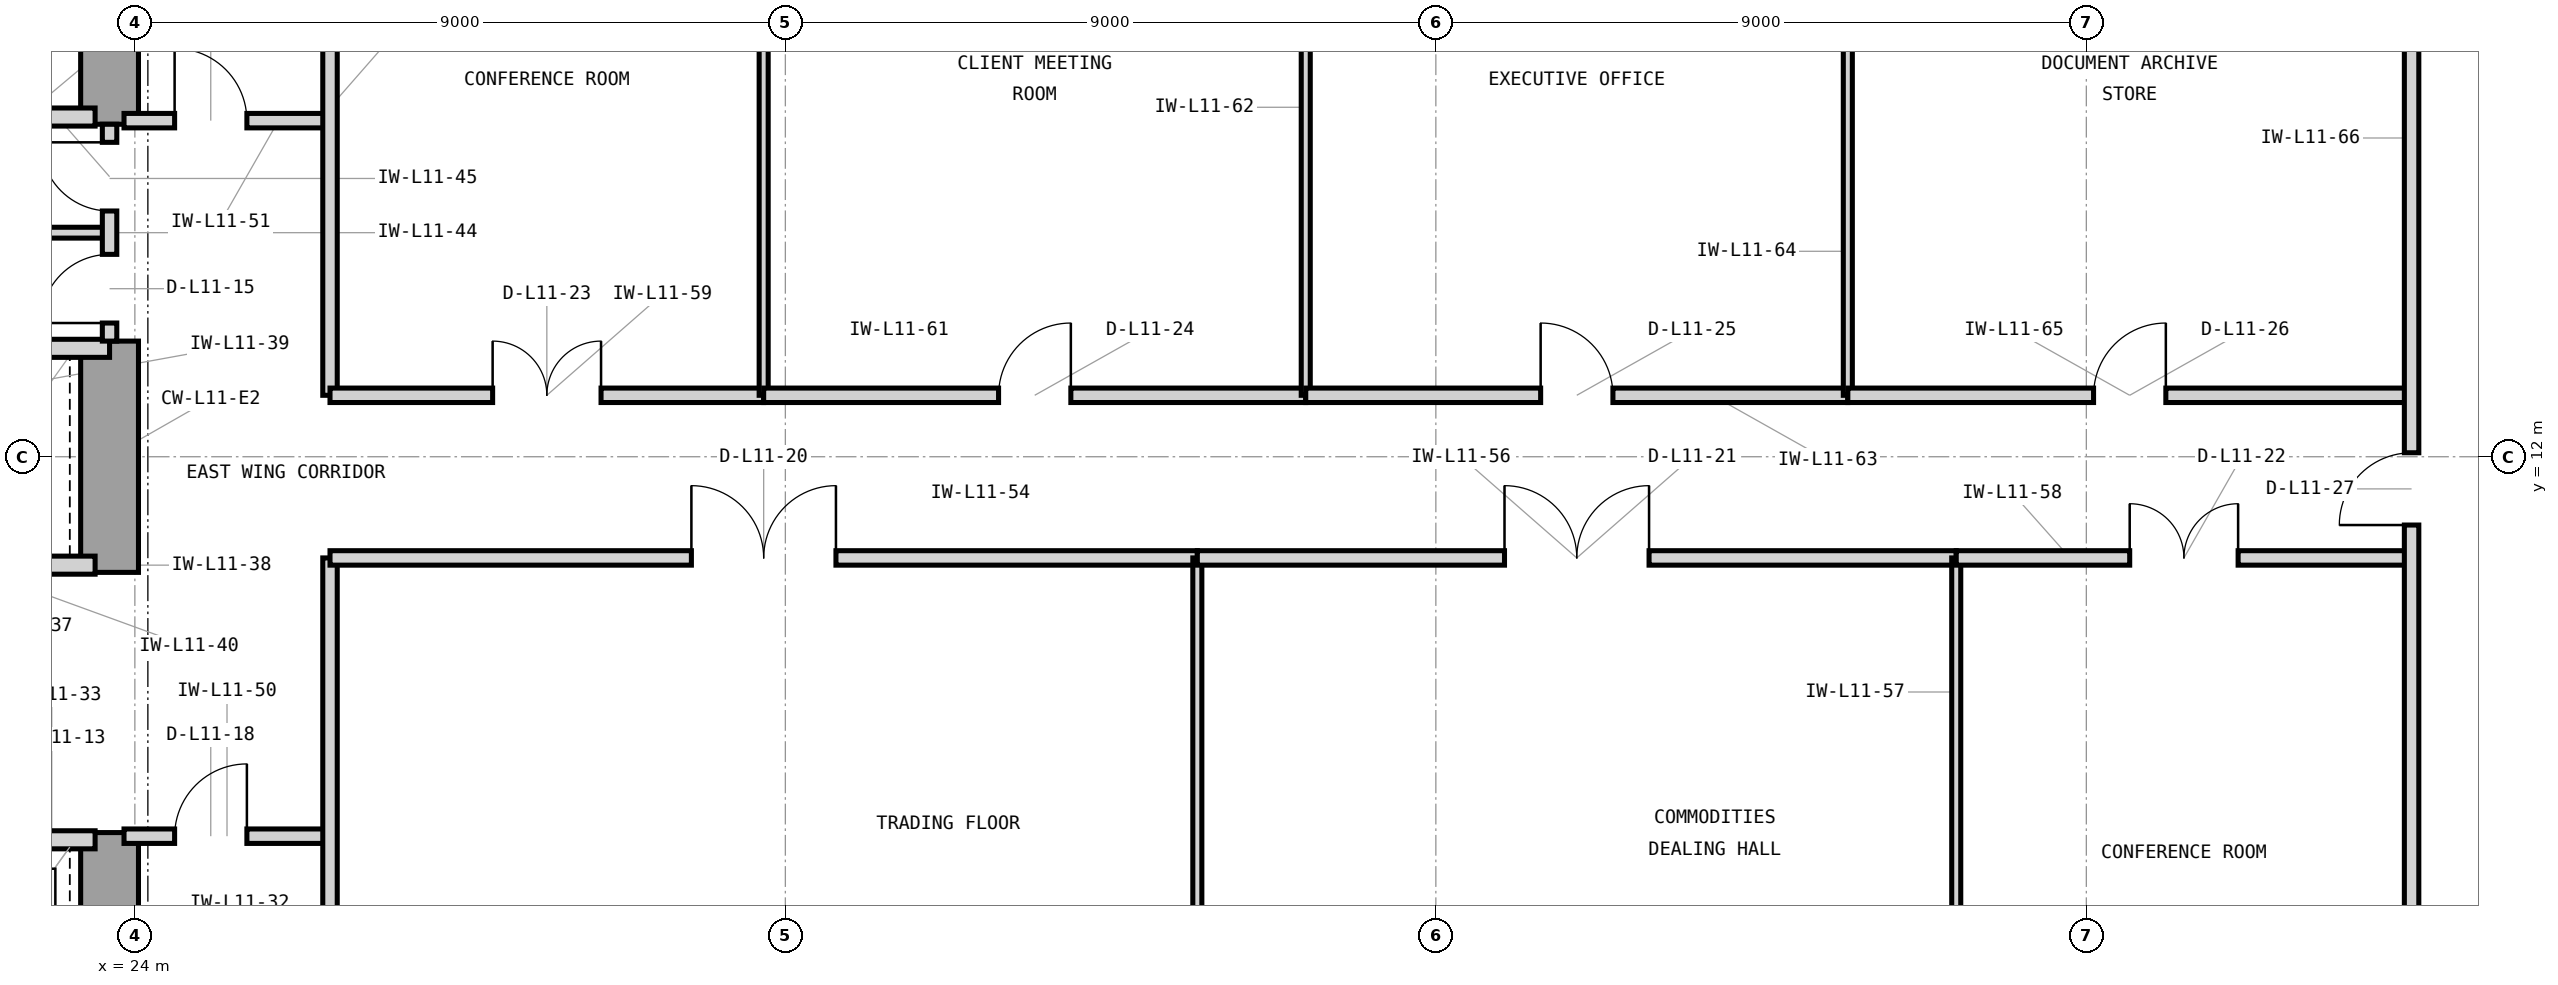
"""IFC4 building model, lengths in metres.
Left out: names, types, materials, properties, quantities, classifications, styles, units other than length and angle.
Written with IfcOpenShell. Run it as: python <this file> out.ifc"""

import sys

from ifc_helpers import new_model, si_unit, direction, frame, frame_2d, origin, place, context, subcontext, project, spatial, rectangle, extrude, element, fill, save


model = new_model("IFC4")
c1 = context("Model", 3, precision=1e-05, world=origin(), true_north=direction((0.0, 1.0)))
c2 = subcontext(c1, "Body", "Model", "MODEL_VIEW")
j1 = project(units=[si_unit("LENGTHUNIT", "METRE"), si_unit("PLANEANGLEUNIT", "RADIAN")], contexts=[c1])
p1 = place(None, origin())
s1 = spatial("IfcSite", under=j1, at=p1, CompositionType="ELEMENT")
p2 = place(p1, origin())
s2 = spatial("IfcBuilding", under=s1, at=p2, CompositionType="ELEMENT")
p3 = place(p2, frame((0.0, 0.0, 51.0)))
s3 = spatial("IfcBuildingStorey", under=s2, at=p3, CompositionType="ELEMENT", Elevation=51.0)
p4 = place(p3, frame((23.65, 3.75, 0.0), z_axis=(0.0, 0.0, 1.0), x_axis=(0.0, 1.0, 0.0)))
e1 = element("IfcWall", 1, at=p4, inside=s3, PredefinedType="SHEAR", context=c2, shape_type="SweptSolid", body=[
    extrude(rectangle(XDim=3.05, YDim=0.8, at=frame_2d((1.525, 0.0))), origin(), (0.0, 0.0, 1.0), 4.2),
])
p5 = place(p3, frame((23.65, 10.4, 0.0), z_axis=(0.0, 0.0, 1.0), x_axis=(0.0, 1.0, 0.0)))
e2 = element("IfcWall", 2, at=p5, inside=s3, PredefinedType="SHEAR", context=c2, shape_type="SweptSolid", body=[
    extrude(rectangle(XDim=3.2, YDim=0.8, at=frame_2d((1.6, 0.0))), origin(), (0.0, 0.0, 1.0), 4.2),
])
p6 = place(p3, frame((23.65, 16.6, 0.0), z_axis=(0.0, 0.0, 1.0), x_axis=(0.0, 1.0, 0.0)))
e3 = element("IfcWall", 3, at=p6, inside=s3, PredefinedType="SHEAR", context=c2, shape_type="SweptSolid", body=[
    extrude(rectangle(XDim=4.05, YDim=0.8, at=frame_2d((2.025, 0.0))), origin(), (0.0, 0.0, 1.0), 4.2),
])
p7 = place(p3, frame((21.05, 16.7, 0.0), z_axis=(0.0, 0.0, 1.0), x_axis=(1.0, 0.0, 0.0)))
e4 = element("IfcWall", 4, at=p7, inside=s3, PredefinedType="PARTITIONING", context=c2, shape_type="SweptSolid", body=[
    extrude(rectangle(XDim=2.4, YDim=0.25, at=frame_2d((1.2, 0.0))), origin(), (0.0, 0.0, 1.0), 3.426),
])
p8 = place(p3, frame((21.05, 6.7, 0.0), z_axis=(0.0, 0.0, 1.0), x_axis=(1.0, 0.0, 0.0)))
e5 = element("IfcWall", 5, at=p8, inside=s3, PredefinedType="PARTITIONING", context=c2, shape_type="SweptSolid", body=[
    extrude(rectangle(XDim=2.4, YDim=0.25, at=frame_2d((1.2, 0.0))), origin(), (0.0, 0.0, 1.0), 3.426),
])
p9 = place(p8, frame((0.48, 0.0, 0.0)))
e6 = element("IfcOpeningElement", 6, at=p9, cuts=e5, PredefinedType="OPENING", context=c2, shape_type="SweptSolid", body=[
    extrude(rectangle(XDim=1.15, YDim=2.25, at=frame_2d((0.575, 1.125))), frame((0.0, 0.135, 0.0), z_axis=(0.0, -1.0, 0.0), x_axis=(1.0, 0.0, 0.0)), (0.0, 0.0, 1.0), 0.27),
])
p10 = place(p3, frame((21.05, 10.5, 0.0), z_axis=(0.0, 0.0, 1.0), x_axis=(1.0, 0.0, 0.0)))
e7 = element("IfcWall", 7, at=p10, inside=s3, PredefinedType="PARTITIONING", context=c2, shape_type="SweptSolid", body=[
    extrude(rectangle(XDim=2.4, YDim=0.25, at=frame_2d((1.2, 0.0))), origin(), (0.0, 0.0, 1.0), 3.426),
])
p11 = place(p3, frame((14.7, 13.5, 0.0), z_axis=(0.0, 0.0, 1.0), x_axis=(1.0, 0.0, 0.0)))
e8 = element("IfcWall", 8, at=p11, inside=s3, PredefinedType="PARTITIONING", context=c2, shape_type="SweptSolid", body=[
    extrude(rectangle(XDim=8.95, YDim=0.25, at=frame_2d((4.475, 0.0))), origin(), (0.0, 0.0, 1.0), 3.426),
])
p12 = place(p3, frame((19.65, 15.1, 0.0), z_axis=(0.0, 0.0, 1.0), x_axis=(1.0, 0.0, 0.0)))
e9 = element("IfcWall", 9, at=p12, inside=s3, PredefinedType="PARTITIONING", context=c2, shape_type="SweptSolid", body=[
    extrude(rectangle(XDim=4.0, YDim=0.15, at=frame_2d((2.0, 0.0))), origin(), (0.0, 0.0, 1.0), 3.97),
])
p13 = place(p3, frame((23.65, 13.6, 0.0), z_axis=(0.0, 0.0, 1.0), x_axis=(0.0, 1.0, 0.0)))
e10 = element("IfcWall", 10, at=p13, inside=s3, PredefinedType="PARTITIONING", context=c2, shape_type="SweptSolid", body=[
    extrude(rectangle(XDim=3.0, YDim=0.2, at=frame_2d((1.5, 0.0))), origin(), (0.0, 0.0, 1.0), 3.97),
])
p14 = place(p13, frame((0.25, 0.0, 0.0)))
e11 = element("IfcOpeningElement", 11, at=p14, cuts=e10, PredefinedType="OPENING", context=c2, shape_type="SweptSolid", body=[
    extrude(rectangle(XDim=0.95, YDim=2.1, at=frame_2d((0.475, 1.05))), frame((0.0, 0.11, 0.0), z_axis=(0.0, -1.0, 0.0), x_axis=(1.0, 0.0, 0.0)), (0.0, 0.0, 1.0), 0.22),
])
p15 = place(p13, frame((1.8, 0.0, 0.0)))
e12 = element("IfcOpeningElement", 12, at=p15, cuts=e10, PredefinedType="OPENING", context=c2, shape_type="SweptSolid", body=[
    extrude(rectangle(XDim=0.95, YDim=2.1, at=frame_2d((0.475, 1.05))), frame((0.0, 0.11, 0.0), z_axis=(0.0, -1.0, 0.0), x_axis=(1.0, 0.0, 0.0)), (0.0, 0.0, 1.0), 0.22),
])
p16 = place(p3, frame((23.85, 6.75, 0.0), z_axis=(0.0, 0.0, 1.0), x_axis=(1.0, 0.0, 0.0)))
e13 = element("IfcWall", 13, at=p16, inside=s3, PredefinedType="PARTITIONING", context=c2, shape_type="SweptSolid", body=[
    extrude(rectangle(XDim=2.85, YDim=0.2, at=frame_2d((1.425, 0.0))), origin(), (0.0, 0.0, 1.0), 3.97),
])
p17 = place(p16, frame((0.7, 0.0, 0.0)))
e14 = element("IfcOpeningElement", 14, at=p17, cuts=e13, PredefinedType="OPENING", context=c2, shape_type="SweptSolid", body=[
    extrude(rectangle(XDim=1.0, YDim=2.15, at=frame_2d((0.5, 1.075))), frame((0.0, 0.11, 0.0), z_axis=(0.0, -1.0, 0.0), x_axis=(1.0, 0.0, 0.0)), (0.0, 0.0, 1.0), 0.22),
])
p18 = place(p3, frame((23.85, 16.65, 0.0), z_axis=(0.0, 0.0, 1.0), x_axis=(1.0, 0.0, 0.0)))
e15 = element("IfcWall", 15, at=p18, inside=s3, PredefinedType="PARTITIONING", context=c2, shape_type="SweptSolid", body=[
    extrude(rectangle(XDim=2.85, YDim=0.2, at=frame_2d((1.425, 0.0))), origin(), (0.0, 0.0, 1.0), 3.97),
])
p19 = place(p18, frame((0.7, 0.0, 0.0)))
e16 = element("IfcOpeningElement", 16, at=p19, cuts=e15, PredefinedType="OPENING", context=c2, shape_type="SweptSolid", body=[
    extrude(rectangle(XDim=1.0, YDim=2.15, at=frame_2d((0.5, 1.075))), frame((0.0, 0.11, 0.0), z_axis=(0.0, -1.0, 0.0), x_axis=(1.0, 0.0, 0.0)), (0.0, 0.0, 1.0), 0.22),
])
p20 = place(p3, frame((26.7, 3.18, 0.0), z_axis=(0.0, 0.0, 1.0), x_axis=(0.0, 1.0, 0.0)))
e17 = element("IfcWall", 17, at=p20, inside=s3, PredefinedType="PARTITIONING", context=c2, shape_type="SweptSolid", body=[
    extrude(rectangle(XDim=7.42, YDim=0.2, at=frame_2d((3.71, 0.0))), origin(), (0.0, 0.0, 1.0), 3.97),
])
p21 = place(p3, frame((26.7, 12.85, 0.0), z_axis=(0.0, 0.0, 1.0), x_axis=(0.0, 1.0, 0.0)))
e18 = element("IfcWall", 18, at=p21, inside=s3, PredefinedType="PARTITIONING", context=c2, shape_type="SweptSolid", body=[
    extrude(rectangle(XDim=7.97, YDim=0.2, at=frame_2d((3.985, 0.0))), origin(), (0.0, 0.0, 1.0), 3.97),
])
p22 = place(p3, frame((26.7, 10.6, 0.0), z_axis=(0.0, 0.0, 1.0), x_axis=(1.0, 0.0, 0.0)))
e19 = element("IfcWall", 19, at=p22, inside=s3, PredefinedType="PARTITIONING", context=c2, shape_type="SweptSolid", body=[
    extrude(rectangle(XDim=12.0, YDim=0.2, at=frame_2d((6.0, 0.0))), origin(), (0.0, 0.0, 1.0), 3.97),
])
p23 = place(p22, frame((5.0, 0.0, 0.0)))
e20 = element("IfcOpeningElement", 20, at=p23, cuts=e19, PredefinedType="OPENING", context=c2, shape_type="SweptSolid", body=[
    extrude(rectangle(XDim=2.0, YDim=2.5, at=frame_2d((1.0, 1.25))), frame((0.0, 0.11, 0.0), z_axis=(0.0, -1.0, 0.0), x_axis=(1.0, 0.0, 0.0)), (0.0, 0.0, 1.0), 0.22),
])
p24 = place(p3, frame((38.7, 3.18, 0.0), z_axis=(0.0, 0.0, 1.0), x_axis=(0.0, 1.0, 0.0)))
e21 = element("IfcWall", 21, at=p24, inside=s3, PredefinedType="PARTITIONING", context=c2, shape_type="SweptSolid", body=[
    extrude(rectangle(XDim=7.42, YDim=0.125, at=frame_2d((3.71, 0.0))), origin(), (0.0, 0.0, 1.0), 3.97),
])
p25 = place(p3, frame((38.7, 10.6, 0.0), z_axis=(0.0, 0.0, 1.0), x_axis=(1.0, 0.0, 0.0)))
e22 = element("IfcWall", 22, at=p25, inside=s3, PredefinedType="PARTITIONING", context=c2, shape_type="SweptSolid", body=[
    extrude(rectangle(XDim=10.5, YDim=0.2, at=frame_2d((5.25, 0.0))), origin(), (0.0, 0.0, 1.0), 3.97),
])
p26 = place(p25, frame((4.25, 0.0, 0.0)))
e23 = element("IfcOpeningElement", 23, at=p26, cuts=e22, PredefinedType="OPENING", context=c2, shape_type="SweptSolid", body=[
    extrude(rectangle(XDim=2.0, YDim=2.5, at=frame_2d((1.0, 1.25))), frame((0.0, 0.11, 0.0), z_axis=(0.0, -1.0, 0.0), x_axis=(1.0, 0.0, 0.0)), (0.0, 0.0, 1.0), 0.22),
])
p27 = place(p3, frame((49.2, 3.18, 0.0), z_axis=(0.0, 0.0, 1.0), x_axis=(0.0, 1.0, 0.0)))
e24 = element("IfcWall", 24, at=p27, inside=s3, PredefinedType="PARTITIONING", context=c2, shape_type="SweptSolid", body=[
    extrude(rectangle(XDim=7.42, YDim=0.125, at=frame_2d((3.71, 0.0))), origin(), (0.0, 0.0, 1.0), 3.97),
])
p28 = place(p3, frame((49.2, 10.6, 0.0), z_axis=(0.0, 0.0, 1.0), x_axis=(1.0, 0.0, 0.0)))
e25 = element("IfcWall", 25, at=p28, inside=s3, PredefinedType="PARTITIONING", context=c2, shape_type="SweptSolid", body=[
    extrude(rectangle(XDim=6.3, YDim=0.2, at=frame_2d((3.15, 0.0))), origin(), (0.0, 0.0, 1.0), 3.97),
])
p29 = place(p28, frame((2.4, 0.0, 0.0)))
e26 = element("IfcOpeningElement", 26, at=p29, cuts=e25, PredefinedType="OPENING", context=c2, shape_type="SweptSolid", body=[
    extrude(rectangle(XDim=1.5, YDim=2.3, at=frame_2d((0.75, 1.15))), frame((0.0, 0.11, 0.0), z_axis=(0.0, -1.0, 0.0), x_axis=(1.0, 0.0, 0.0)), (0.0, 0.0, 1.0), 0.22),
])
p30 = place(p3, frame((26.7, 12.85, 0.0), z_axis=(0.0, 0.0, 1.0), x_axis=(1.0, 0.0, 0.0)))
e27 = element("IfcWall", 27, at=p30, inside=s3, PredefinedType="PARTITIONING", context=c2, shape_type="SweptSolid", body=[
    extrude(rectangle(XDim=6.0, YDim=0.2, at=frame_2d((3.0, 0.0))), origin(), (0.0, 0.0, 1.0), 3.97),
])
p31 = place(p30, frame((2.25, 0.0, 0.0)))
e28 = element("IfcOpeningElement", 28, at=p31, cuts=e27, PredefinedType="OPENING", context=c2, shape_type="SweptSolid", body=[
    extrude(rectangle(XDim=1.5, YDim=2.3, at=frame_2d((0.75, 1.15))), frame((0.0, 0.11, 0.0), z_axis=(0.0, -1.0, 0.0), x_axis=(1.0, 0.0, 0.0)), (0.0, 0.0, 1.0), 0.22),
])
p32 = place(p3, frame((32.7, 12.85, 0.0), z_axis=(0.0, 0.0, 1.0), x_axis=(0.0, 1.0, 0.0)))
e29 = element("IfcWall", 29, at=p32, inside=s3, PredefinedType="PARTITIONING", context=c2, shape_type="SweptSolid", body=[
    extrude(rectangle(XDim=7.97, YDim=0.125, at=frame_2d((3.985, 0.0))), origin(), (0.0, 0.0, 1.0), 3.97),
])
p33 = place(p3, frame((32.7, 12.85, 0.0), z_axis=(0.0, 0.0, 1.0), x_axis=(1.0, 0.0, 0.0)))
e30 = element("IfcWall", 30, at=p33, inside=s3, PredefinedType="PARTITIONING", context=c2, shape_type="SweptSolid", body=[
    extrude(rectangle(XDim=7.5, YDim=0.2, at=frame_2d((3.75, 0.0))), origin(), (0.0, 0.0, 1.0), 3.97),
])
p34 = place(p33, frame((3.25, 0.0, 0.0)))
e31 = element("IfcOpeningElement", 31, at=p34, cuts=e30, PredefinedType="OPENING", context=c2, shape_type="SweptSolid", body=[
    extrude(rectangle(XDim=1.0, YDim=2.15, at=frame_2d((0.5, 1.075))), frame((0.0, 0.11, 0.0), z_axis=(0.0, -1.0, 0.0), x_axis=(1.0, 0.0, 0.0)), (0.0, 0.0, 1.0), 0.22),
])
p35 = place(p3, frame((40.2, 12.85, 0.0), z_axis=(0.0, 0.0, 1.0), x_axis=(0.0, 1.0, 0.0)))
e32 = element("IfcWall", 32, at=p35, inside=s3, PredefinedType="PARTITIONING", context=c2, shape_type="SweptSolid", body=[
    extrude(rectangle(XDim=7.97, YDim=0.125, at=frame_2d((3.985, 0.0))), origin(), (0.0, 0.0, 1.0), 3.97),
])
p36 = place(p3, frame((40.2, 12.85, 0.0), z_axis=(0.0, 0.0, 1.0), x_axis=(1.0, 0.0, 0.0)))
e33 = element("IfcWall", 33, at=p36, inside=s3, PredefinedType="PARTITIONING", context=c2, shape_type="SweptSolid", body=[
    extrude(rectangle(XDim=7.5, YDim=0.2, at=frame_2d((3.75, 0.0))), origin(), (0.0, 0.0, 1.0), 3.97),
])
p37 = place(p36, frame((3.25, 0.0, 0.0)))
e34 = element("IfcOpeningElement", 34, at=p37, cuts=e33, PredefinedType="OPENING", context=c2, shape_type="SweptSolid", body=[
    extrude(rectangle(XDim=1.0, YDim=2.15, at=frame_2d((0.5, 1.075))), frame((0.0, 0.11, 0.0), z_axis=(0.0, -1.0, 0.0), x_axis=(1.0, 0.0, 0.0)), (0.0, 0.0, 1.0), 0.22),
])
p38 = place(p3, frame((47.7, 12.85, 0.0), z_axis=(0.0, 0.0, 1.0), x_axis=(0.0, 1.0, 0.0)))
e35 = element("IfcWall", 35, at=p38, inside=s3, PredefinedType="PARTITIONING", context=c2, shape_type="SweptSolid", body=[
    extrude(rectangle(XDim=7.97, YDim=0.125, at=frame_2d((3.985, 0.0))), origin(), (0.0, 0.0, 1.0), 3.97),
])
p39 = place(p3, frame((47.7, 12.85, 0.0), z_axis=(0.0, 0.0, 1.0), x_axis=(1.0, 0.0, 0.0)))
e36 = element("IfcWall", 36, at=p39, inside=s3, PredefinedType="PARTITIONING", context=c2, shape_type="SweptSolid", body=[
    extrude(rectangle(XDim=7.8, YDim=0.2, at=frame_2d((3.9, 0.0))), origin(), (0.0, 0.0, 1.0), 3.97),
])
p40 = place(p39, frame((3.4, 0.0, 0.0)))
e37 = element("IfcOpeningElement", 37, at=p40, cuts=e36, PredefinedType="OPENING", context=c2, shape_type="SweptSolid", body=[
    extrude(rectangle(XDim=1.0, YDim=2.15, at=frame_2d((0.5, 1.075))), frame((0.0, 0.11, 0.0), z_axis=(0.0, -1.0, 0.0), x_axis=(1.0, 0.0, 0.0)), (0.0, 0.0, 1.0), 0.22),
])
p41 = place(p3, frame((55.5, 3.18, 0.0), z_axis=(0.0, 0.0, 1.0), x_axis=(0.0, 1.0, 0.0)))
e38 = element("IfcWall", 38, at=p41, inside=s3, PredefinedType="PARTITIONING", context=c2, shape_type="SweptSolid", body=[
    extrude(rectangle(XDim=17.64, YDim=0.2, at=frame_2d((8.82, 0.0))), origin(), (0.0, 0.0, 1.0), 3.97),
])
p42 = place(p41, frame((7.875, 0.0, 0.0)))
e39 = element("IfcOpeningElement", 39, at=p42, cuts=e38, PredefinedType="OPENING", context=c2, shape_type="SweptSolid", body=[
    extrude(rectangle(XDim=1.0, YDim=2.15, at=frame_2d((0.5, 1.075))), frame((0.0, 0.11, 0.0), z_axis=(0.0, -1.0, 0.0), x_axis=(1.0, 0.0, 0.0)), (0.0, 0.0, 1.0), 0.22),
])
p43 = place(p14, origin())
e40 = element("IfcDoor", 40, at=p43, inside=s3, OperationType="SINGLE_SWING_LEFT", PredefinedType="DOOR", context=c2, shape_type="SweptSolid", body=[
    extrude(rectangle(XDim=0.95, YDim=2.1, at=frame_2d((0.475, 1.05))), frame((0.0, 0.025, 0.0), z_axis=(0.0, -1.0, 0.0), x_axis=(1.0, 0.0, 0.0)), (0.0, 0.0, 1.0), 0.05),
])
fill(e11, e40)
p44 = place(p15, origin())
e41 = element("IfcDoor", 41, at=p44, inside=s3, OperationType="SINGLE_SWING_RIGHT", PredefinedType="DOOR", context=c2, shape_type="SweptSolid", body=[
    extrude(rectangle(XDim=0.95, YDim=2.1, at=frame_2d((0.475, 1.05))), frame((0.0, 0.025, 0.0), z_axis=(0.0, -1.0, 0.0), x_axis=(1.0, 0.0, 0.0)), (0.0, 0.0, 1.0), 0.05),
])
fill(e12, e41)
p45 = place(p17, origin())
e42 = element("IfcDoor", 42, at=p45, inside=s3, OperationType="SINGLE_SWING_RIGHT", PredefinedType="DOOR", context=c2, shape_type="SweptSolid", body=[
    extrude(rectangle(XDim=1.0, YDim=2.15, at=frame_2d((0.5, 1.075))), frame((0.0, 0.025, 0.0), z_axis=(0.0, -1.0, 0.0), x_axis=(1.0, 0.0, 0.0)), (0.0, 0.0, 1.0), 0.05),
])
fill(e14, e42)
p46 = place(p19, origin())
e43 = element("IfcDoor", 43, at=p46, inside=s3, OperationType="SINGLE_SWING_LEFT", PredefinedType="DOOR", context=c2, shape_type="SweptSolid", body=[
    extrude(rectangle(XDim=1.0, YDim=2.15, at=frame_2d((0.5, 1.075))), frame((0.0, 0.025, 0.0), z_axis=(0.0, -1.0, 0.0), x_axis=(1.0, 0.0, 0.0)), (0.0, 0.0, 1.0), 0.05),
])
fill(e16, e43)
p47 = place(p23, origin())
e44 = element("IfcDoor", 44, at=p47, inside=s3, OperationType="DOUBLE_DOOR_SINGLE_SWING", PredefinedType="DOOR", context=c2, shape_type="SweptSolid", body=[
    extrude(rectangle(XDim=2.0, YDim=2.5, at=frame_2d((1.0, 1.25))), frame((0.0, 0.025, 0.0), z_axis=(0.0, -1.0, 0.0), x_axis=(1.0, 0.0, 0.0)), (0.0, 0.0, 1.0), 0.05),
])
fill(e20, e44)
p48 = place(p26, origin())
e45 = element("IfcDoor", 45, at=p48, inside=s3, OperationType="DOUBLE_DOOR_SINGLE_SWING", PredefinedType="DOOR", context=c2, shape_type="SweptSolid", body=[
    extrude(rectangle(XDim=2.0, YDim=2.5, at=frame_2d((1.0, 1.25))), frame((0.0, 0.025, 0.0), z_axis=(0.0, -1.0, 0.0), x_axis=(1.0, 0.0, 0.0)), (0.0, 0.0, 1.0), 0.05),
])
fill(e23, e45)
p49 = place(p29, origin())
e46 = element("IfcDoor", 46, at=p49, inside=s3, OperationType="DOUBLE_DOOR_SINGLE_SWING", PredefinedType="DOOR", context=c2, shape_type="SweptSolid", body=[
    extrude(rectangle(XDim=1.5, YDim=2.3, at=frame_2d((0.75, 1.15))), frame((0.0, 0.025, 0.0), z_axis=(0.0, -1.0, 0.0), x_axis=(1.0, 0.0, 0.0)), (0.0, 0.0, 1.0), 0.05),
])
fill(e26, e46)
p50 = place(p31, origin())
e47 = element("IfcDoor", 47, at=p50, inside=s3, OperationType="DOUBLE_DOOR_SINGLE_SWING", PredefinedType="DOOR", context=c2, shape_type="SweptSolid", body=[
    extrude(rectangle(XDim=1.5, YDim=2.3, at=frame_2d((0.75, 1.15))), frame((0.0, 0.025, 0.0), z_axis=(0.0, -1.0, 0.0), x_axis=(1.0, 0.0, 0.0)), (0.0, 0.0, 1.0), 0.05),
])
fill(e28, e47)
p51 = place(p34, origin())
e48 = element("IfcDoor", 48, at=p51, inside=s3, OperationType="SINGLE_SWING_RIGHT", PredefinedType="DOOR", context=c2, shape_type="SweptSolid", body=[
    extrude(rectangle(XDim=1.0, YDim=2.15, at=frame_2d((0.5, 1.075))), frame((0.0, 0.025, 0.0), z_axis=(0.0, -1.0, 0.0), x_axis=(1.0, 0.0, 0.0)), (0.0, 0.0, 1.0), 0.05),
])
fill(e31, e48)
p52 = place(p37, origin())
e49 = element("IfcDoor", 49, at=p52, inside=s3, OperationType="SINGLE_SWING_LEFT", PredefinedType="DOOR", context=c2, shape_type="SweptSolid", body=[
    extrude(rectangle(XDim=1.0, YDim=2.15, at=frame_2d((0.5, 1.075))), frame((0.0, 0.025, 0.0), z_axis=(0.0, -1.0, 0.0), x_axis=(1.0, 0.0, 0.0)), (0.0, 0.0, 1.0), 0.05),
])
fill(e34, e49)
p53 = place(p40, origin())
e50 = element("IfcDoor", 50, at=p53, inside=s3, OperationType="SINGLE_SWING_RIGHT", PredefinedType="DOOR", context=c2, shape_type="SweptSolid", body=[
    extrude(rectangle(XDim=1.0, YDim=2.15, at=frame_2d((0.5, 1.075))), frame((0.0, 0.025, 0.0), z_axis=(0.0, -1.0, 0.0), x_axis=(1.0, 0.0, 0.0)), (0.0, 0.0, 1.0), 0.05),
])
fill(e37, e50)
p54 = place(p42, origin())
e51 = element("IfcDoor", 51, at=p54, inside=s3, OperationType="SINGLE_SWING_LEFT", PredefinedType="DOOR", context=c2, shape_type="SweptSolid", body=[
    extrude(rectangle(XDim=1.0, YDim=2.15, at=frame_2d((0.5, 1.075))), frame((0.0, 0.025, 0.0), z_axis=(0.0, -1.0, 0.0), x_axis=(1.0, 0.0, 0.0)), (0.0, 0.0, 1.0), 0.05),
])
fill(e39, e51)
save(model, sys.argv[1])
